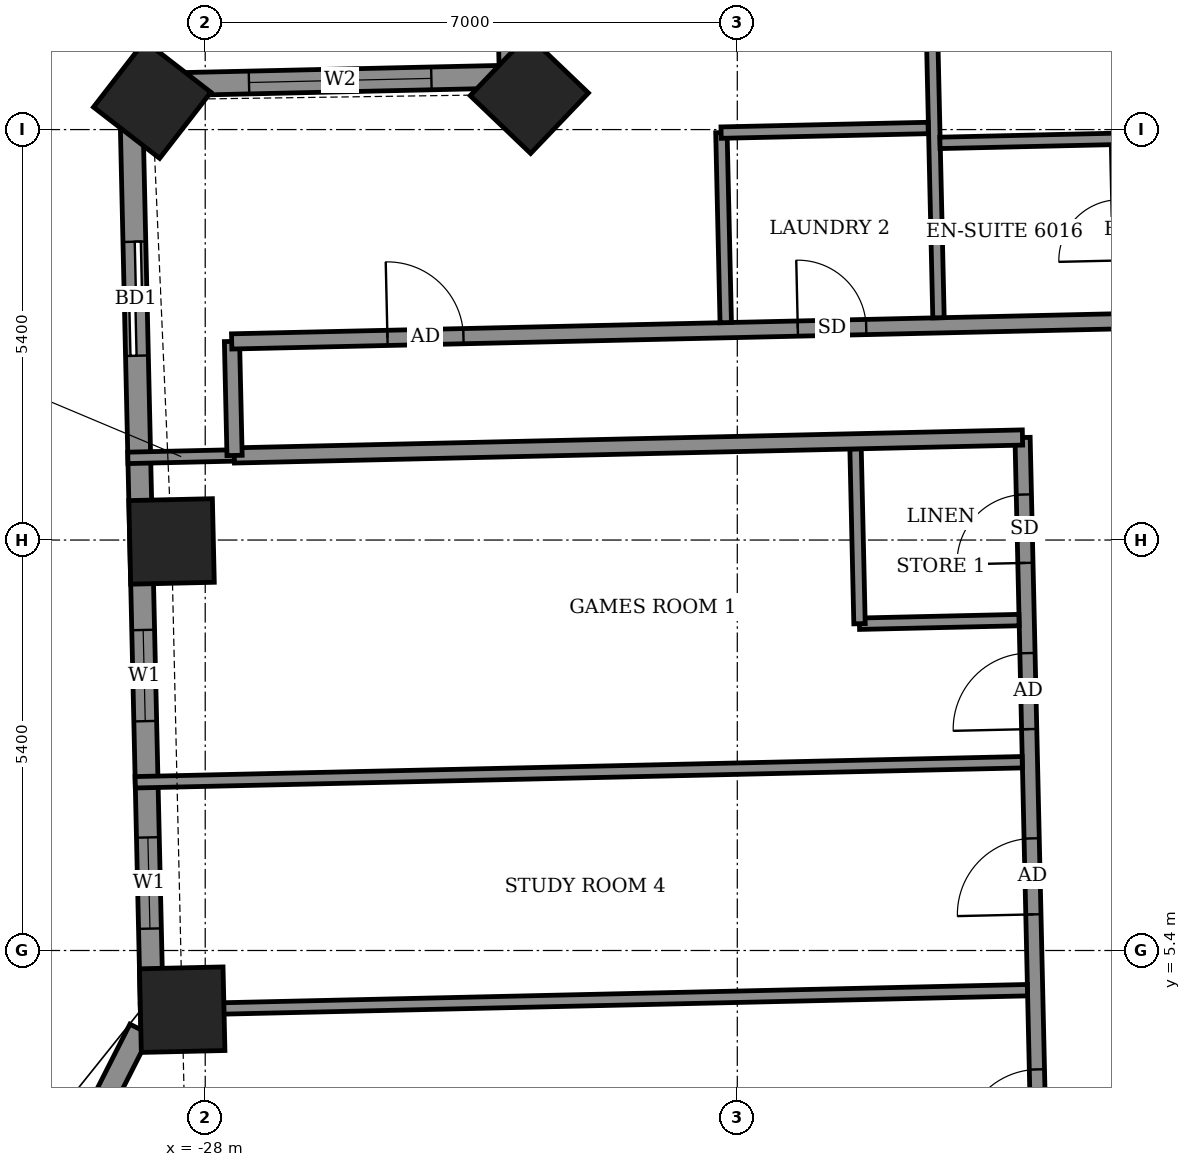
"""IFC4 building model, lengths in metres.
Left out: names, types, materials, properties, quantities, classifications, styles, units other than length and angle.
Written with IfcOpenShell. Run it as: python <this file> out.ifc"""

import sys

from ifc_helpers import new_model, si_unit, direction, frame, frame_2d, origin, origin_2d, place, context, subcontext, project, spatial, rectangle, extrude, element, fill, save


model = new_model("IFC4")
c1 = context("Model", 3, precision=1e-05, world=origin(), true_north=direction((0.0, 1.0)))
c2 = subcontext(c1, "Body", "Model", "MODEL_VIEW")
j1 = project(units=[si_unit("LENGTHUNIT", "METRE"), si_unit("PLANEANGLEUNIT", "RADIAN")], contexts=[c1])
p1 = place(None, origin())
s1 = spatial("IfcSite", under=j1, at=p1, CompositionType="ELEMENT")
p2 = place(p1, origin())
s2 = spatial("IfcBuilding", under=s1, at=p2, CompositionType="ELEMENT")
p3 = place(p2, frame((0.0, 0.0, 238.3)))
s3 = spatial("IfcBuildingStorey", under=s2, at=p3, CompositionType="ELEMENT", Elevation=238.3)
for number, where, z_axis, x_axis in (
    (1, (-23.736, 16.664, -0.55), (0.0, 0.0, 1.0), (-0.691, -0.723, 0.0)),
    (2, (-28.698, 16.593, -0.55), (0.0, 0.0, 1.0), (-0.612, -0.791, 0.0)),
    (3, (-28.443, 10.781, -0.55), (0.0, 0.0, 1.0), (0.023, -1.0, 0.0)),
    (4, (-28.303, 4.622, -0.55), (0.0, 0.0, 1.0), (0.023, -1.0, 0.0)),
):
    element("IfcColumn", number, at=place(p3, frame(where, z_axis=z_axis, x_axis=x_axis)), inside=s3, PredefinedType="COLUMN", context=c2, shape_type="SweptSolid", body=[
        extrude(rectangle(XDim=1.1, YDim=1.1, at=origin_2d()), origin(), (0.0, 0.0, 1.0), 3.6),
    ])
p4 = place(p3, frame((-24.094, 21.896, 0.0), z_axis=(0.0, 0.0, 1.0), x_axis=(0.022606059803, -0.999744450377, 0.0)))
e5 = element("IfcWall", 5, at=p4, inside=s3, PredefinedType="SOLIDWALL", context=c2, shape_type="SweptSolid", body=[
    extrude(rectangle(XDim=5.0, YDim=0.3, at=frame_2d((2.5, 0.0))), origin(), (0.0, 0.0, 1.0), 2.55),
])
p5 = place(p4, frame((1.566, 0.0, 0.9)))
e6 = element("IfcOpeningElement", 6, at=p5, cuts=e5, PredefinedType="OPENING", context=c2, shape_type="SweptSolid", body=[
    extrude(rectangle(XDim=2.4, YDim=1.5, at=frame_2d((1.2, 0.75))), frame((0.0, 0.16, 0.0), z_axis=(0.0, -1.0, 0.0), x_axis=(1.0, 0.0, 0.0)), (0.0, 0.0, 1.0), 0.32),
])
p6 = place(p3, frame((-23.981, 16.897, 0.0), z_axis=(0.0, 0.0, 1.0), x_axis=(-0.999744350543, -0.022610474516, 0.0)))
e7 = element("IfcWall", 7, at=p6, inside=s3, PredefinedType="SOLIDWALL", context=c2, shape_type="SweptSolid", body=[
    extrude(rectangle(XDim=4.999, YDim=0.3, at=frame_2d((2.5, 0.0))), origin(), (0.0, 0.0, 1.0), 2.55),
])
p7 = place(p6, frame((1.044, 0.0, 0.9)))
e8 = element("IfcOpeningElement", 8, at=p7, cuts=e7, PredefinedType="OPENING", context=c2, shape_type="SweptSolid", body=[
    extrude(rectangle(XDim=2.4, YDim=1.5, at=frame_2d((1.2, 0.75))), frame((0.0, 0.16, 0.0), z_axis=(0.0, -1.0, 0.0), x_axis=(1.0, 0.0, 0.0)), (0.0, 0.0, 1.0), 0.32),
])
p8 = place(p3, frame((-28.979, 16.784, 0.0), z_axis=(0.0, 0.0, 1.0), x_axis=(0.022685159264, -0.999742658662, 0.0)))
e9 = element("IfcWall", 9, at=p8, inside=s3, PredefinedType="SOLIDWALL", context=c2, shape_type="SweptSolid", body=[
    extrude(rectangle(XDim=12.699, YDim=0.3, at=frame_2d((6.35, 0.0))), origin(), (0.0, 0.0, 1.0), 2.55),
])
p9 = place(p8, frame((2.06, 0.0, 0.0)))
e10 = element("IfcOpeningElement", 10, at=p9, cuts=e9, PredefinedType="OPENING", context=c2, shape_type="SweptSolid", body=[
    extrude(rectangle(XDim=1.5, YDim=2.4, at=frame_2d((0.75, 1.2))), frame((0.0, 0.16, 0.0), z_axis=(0.0, -1.0, 0.0), x_axis=(1.0, 0.0, 0.0)), (0.0, 0.0, 1.0), 0.32),
])
p10 = place(p8, frame((7.169, 0.0, 0.9)))
e11 = element("IfcOpeningElement", 11, at=p10, cuts=e9, PredefinedType="OPENING", context=c2, shape_type="SweptSolid", body=[
    extrude(rectangle(XDim=1.2, YDim=1.5, at=frame_2d((0.6, 0.75))), frame((0.0, 0.16, 0.0), z_axis=(0.0, -1.0, 0.0), x_axis=(1.0, 0.0, 0.0)), (0.0, 0.0, 1.0), 0.32),
])
p11 = place(p8, frame((9.899, 0.0, 0.9)))
e12 = element("IfcOpeningElement", 12, at=p11, cuts=e9, PredefinedType="OPENING", context=c2, shape_type="SweptSolid", body=[
    extrude(rectangle(XDim=1.2, YDim=1.5, at=frame_2d((0.6, 0.75))), frame((0.0, 0.16, 0.0), z_axis=(0.0, -1.0, 0.0), x_axis=(1.0, 0.0, 0.0)), (0.0, 0.0, 1.0), 0.32),
])
p12 = place(p3, frame((-28.857, 4.363, 0.0), z_axis=(0.0, 0.0, 1.0), x_axis=(-0.45277700056, -0.891623792731, 0.0)))
e13 = element("IfcWall", 13, at=p12, inside=s3, PredefinedType="SOLIDWALL", context=c2, shape_type="SweptSolid", body=[
    extrude(rectangle(XDim=5.398, YDim=0.3, at=frame_2d((2.699, 0.0))), origin(), (0.0, 0.0, 1.0), 3.05),
])
p13 = place(p12, frame((3.881, 0.0, 0.9)))
e14 = element("IfcOpeningElement", 14, at=p13, cuts=e13, PredefinedType="OPENING", context=c2, shape_type="SweptSolid", body=[
    extrude(rectangle(XDim=1.2, YDim=1.5, at=frame_2d((0.6, 0.75))), frame((0.0, 0.16, 0.0), z_axis=(0.0, -1.0, 0.0), x_axis=(1.0, 0.0, 0.0)), (0.0, 0.0, 1.0), 0.32),
])
p14 = place(p3, frame((-16.678, -12.919, 0.0), z_axis=(0.0, 0.0, 1.0), x_axis=(-0.022696191528, 0.999742408268, 0.0)))
e15 = element("IfcWall", 15, at=p14, inside=s3, PredefinedType="PARTITIONING", context=c2, shape_type="SweptSolid", body=[
    extrude(rectangle(XDim=25.074, YDim=0.2, at=frame_2d((12.537, 0.0))), origin(), (0.0, 0.0, 1.0), 3.05),
])
p15 = place(p14, frame((21.237, 0.0, 0.0)))
e16 = element("IfcOpeningElement", 16, at=p15, cuts=e15, PredefinedType="OPENING", context=c2, shape_type="SweptSolid", body=[
    extrude(rectangle(XDim=1.0, YDim=2.1, at=frame_2d((0.5, 1.05))), frame((0.0, 0.11, 0.0), z_axis=(0.0, -1.0, 0.0), x_axis=(1.0, 0.0, 0.0)), (0.0, 0.0, 1.0), 0.22),
])
p16 = place(p14, frame((23.424, 0.0, 0.0)))
e17 = element("IfcOpeningElement", 17, at=p16, cuts=e15, PredefinedType="OPENING", context=c2, shape_type="SweptSolid", body=[
    extrude(rectangle(XDim=0.9, YDim=2.1, at=frame_2d((0.45, 1.05))), frame((0.0, 0.11, 0.0), z_axis=(0.0, -1.0, 0.0), x_axis=(1.0, 0.0, 0.0)), (0.0, 0.0, 1.0), 0.22),
])
p17 = place(p14, frame((18.799, 0.0, 0.0)))
e18 = element("IfcOpeningElement", 18, at=p17, cuts=e15, PredefinedType="OPENING", context=c2, shape_type="SweptSolid", body=[
    extrude(rectangle(XDim=1.0, YDim=2.1, at=frame_2d((0.5, 1.05))), frame((0.0, 0.11, 0.0), z_axis=(0.0, -1.0, 0.0), x_axis=(1.0, 0.0, 0.0)), (0.0, 0.0, 1.0), 0.22),
])
p18 = place(p14, frame((15.759, 0.0, 0.0)))
e19 = element("IfcOpeningElement", 19, at=p18, cuts=e15, PredefinedType="OPENING", context=c2, shape_type="SweptSolid", body=[
    extrude(rectangle(XDim=1.0, YDim=2.1, at=frame_2d((0.5, 1.05))), frame((0.0, 0.11, 0.0), z_axis=(0.0, -1.0, 0.0), x_axis=(1.0, 0.0, 0.0)), (0.0, 0.0, 1.0), 0.22),
])
p19 = place(p14, frame((12.76, 0.0, 0.0)))
e20 = element("IfcOpeningElement", 20, at=p19, cuts=e15, PredefinedType="OPENING", context=c2, shape_type="SweptSolid", body=[
    extrude(rectangle(XDim=1.0, YDim=2.1, at=frame_2d((0.5, 1.05))), frame((0.0, 0.11, 0.0), z_axis=(0.0, -1.0, 0.0), x_axis=(1.0, 0.0, 0.0)), (0.0, 0.0, 1.0), 0.22),
])
p20 = place(p14, frame((9.752, 0.0, 0.0)))
e21 = element("IfcOpeningElement", 21, at=p20, cuts=e15, PredefinedType="OPENING", context=c2, shape_type="SweptSolid", body=[
    extrude(rectangle(XDim=1.0, YDim=2.1, at=frame_2d((0.5, 1.05))), frame((0.0, 0.11, 0.0), z_axis=(0.0, -1.0, 0.0), x_axis=(1.0, 0.0, 0.0)), (0.0, 0.0, 1.0), 0.22),
])
p21 = place(p14, frame((7.199, 0.0, 0.0)))
e22 = element("IfcOpeningElement", 22, at=p21, cuts=e15, PredefinedType="OPENING", context=c2, shape_type="SweptSolid", body=[
    extrude(rectangle(XDim=1.0, YDim=2.1, at=frame_2d((0.5, 1.05))), frame((0.0, 0.11, 0.0), z_axis=(0.0, -1.0, 0.0), x_axis=(1.0, 0.0, 0.0)), (0.0, 0.0, 1.0), 0.22),
])
p22 = place(p14, frame((4.899, 0.0, 0.0)))
e23 = element("IfcOpeningElement", 23, at=p22, cuts=e15, PredefinedType="OPENING", context=c2, shape_type="SweptSolid", body=[
    extrude(rectangle(XDim=0.9, YDim=2.1, at=frame_2d((0.45, 1.05))), frame((0.0, 0.11, 0.0), z_axis=(0.0, -1.0, 0.0), x_axis=(1.0, 0.0, 0.0)), (0.0, 0.0, 1.0), 0.22),
])
p23 = place(p3, frame((-28.853, 4.613, 0.0), z_axis=(0.0, 0.0, 1.0), x_axis=(0.999742483, 0.022692899457, 0.0)))
e24 = element("IfcWall", 24, at=p23, inside=s3, PredefinedType="PARTITIONING", context=c2, shape_type="SweptSolid", body=[
    extrude(rectangle(XDim=11.673, YDim=0.15, at=frame_2d((5.836, 0.0))), origin(), (0.0, 0.0, 1.0), 3.05),
])
p24 = place(p3, frame((-28.921, 7.613, 0.0), z_axis=(0.0, 0.0, 1.0), x_axis=(0.999744377516, 0.022609281843, 0.0)))
e25 = element("IfcWall", 25, at=p24, inside=s3, PredefinedType="PARTITIONING", context=c2, shape_type="SweptSolid", body=[
    extrude(rectangle(XDim=11.673, YDim=0.15, at=frame_2d((5.836, 0.0))), origin(), (0.0, 0.0, 1.0), 2.55),
])
p25 = place(p3, frame((-19.393, 9.699, 0.0), z_axis=(0.0, 0.0, 1.0), x_axis=(0.999737616439, 0.022906293375, 0.0)))
e26 = element("IfcWall", 26, at=p25, inside=s3, PredefinedType="PARTITIONING", context=c2, shape_type="SweptSolid", body=[
    extrude(rectangle(XDim=2.1, YDim=0.15, at=frame_2d((1.05, 0.0))), origin(), (0.0, 0.0, 1.0), 3.05),
])
p26 = place(p3, frame((-19.392, 9.699, 0.0), z_axis=(0.0, 0.0, 1.0), x_axis=(-0.022603288534, 0.999744513037, 0.0)))
e27 = element("IfcWall", 27, at=p26, inside=s3, PredefinedType="PARTITIONING", context=c2, shape_type="SweptSolid", body=[
    extrude(rectangle(XDim=2.301, YDim=0.15, at=frame_2d((1.15, 0.0))), origin(), (0.0, 0.0, 1.0), 3.05),
])
p27 = place(p3, frame((-29.018, 11.881, 0.0), z_axis=(0.0, 0.0, 1.0), x_axis=(0.999740667531, 0.022772739949, 0.0)))
e28 = element("IfcWall", 28, at=p27, inside=s3, PredefinedType="PARTITIONING", context=c2, shape_type="SweptSolid", body=[
    extrude(rectangle(XDim=1.404, YDim=0.15, at=frame_2d((0.702, 0.0))), origin(), (0.0, 0.0, 1.0), 2.55),
])
p28 = place(p3, frame((-27.618, 11.913, 0.0), z_axis=(0.0, 0.0, 1.0), x_axis=(0.999741483035, 0.022736910479, 0.0)))
e29 = element("IfcWall", 29, at=p28, inside=s3, PredefinedType="PARTITIONING", context=c2, shape_type="SweptSolid", body=[
    extrude(rectangle(XDim=10.373, YDim=0.2, at=frame_2d((5.186, 0.0))), origin(), (0.0, 0.0, 1.0), 3.05),
])
p29 = place(p3, frame((-27.614, 11.913, 0.0), z_axis=(0.0, 0.0, 1.0), x_axis=(-0.022617910375, 0.999744182344, 0.0)))
e30 = element("IfcWall", 30, at=p29, inside=s3, PredefinedType="PARTITIONING", context=c2, shape_type="SweptSolid", body=[
    extrude(rectangle(XDim=1.5, YDim=0.2, at=frame_2d((0.75, 0.0))), origin(), (0.0, 0.0, 1.0), 3.05),
])
p30 = place(p3, frame((-27.652, 13.413, 0.0), z_axis=(0.0, 0.0, 1.0), x_axis=(0.999742610679, 0.022687273792, 0.0)))
e31 = element("IfcWall", 31, at=p30, inside=s3, PredefinedType="PARTITIONING", context=c2, shape_type="SweptSolid", body=[
    extrude(rectangle(XDim=50.857, YDim=0.2, at=frame_2d((25.429, 0.0))), origin(), (0.0, 0.0, 1.0), 3.05),
])
p31 = place(p30, frame((49.179, 0.0, 0.0)))
e32 = element("IfcOpeningElement", 32, at=p31, cuts=e31, PredefinedType="OPENING", context=c2, shape_type="SweptSolid", body=[
    extrude(rectangle(XDim=1.0, YDim=2.1, at=frame_2d((0.5, 1.05))), frame((0.0, 0.11, 0.0), z_axis=(0.0, -1.0, 0.0), x_axis=(1.0, 0.0, 0.0)), (0.0, 0.0, 1.0), 0.22),
])
p32 = place(p30, frame((44.9, 0.0, 0.0)))
e33 = element("IfcOpeningElement", 33, at=p32, cuts=e31, PredefinedType="OPENING", context=c2, shape_type="SweptSolid", body=[
    extrude(rectangle(XDim=0.9, YDim=2.1, at=frame_2d((0.45, 1.05))), frame((0.0, 0.11, 0.0), z_axis=(0.0, -1.0, 0.0), x_axis=(1.0, 0.0, 0.0)), (0.0, 0.0, 1.0), 0.22),
])
p33 = place(p30, frame((40.375, 0.0, 0.0)))
e34 = element("IfcOpeningElement", 34, at=p33, cuts=e31, PredefinedType="OPENING", context=c2, shape_type="SweptSolid", body=[
    extrude(rectangle(XDim=0.9, YDim=2.1, at=frame_2d((0.45, 1.05))), frame((0.0, 0.11, 0.0), z_axis=(0.0, -1.0, 0.0), x_axis=(1.0, 0.0, 0.0)), (0.0, 0.0, 1.0), 0.22),
])
p34 = place(p30, frame((38.425, 0.0, 0.0)))
e35 = element("IfcOpeningElement", 35, at=p34, cuts=e31, PredefinedType="OPENING", context=c2, shape_type="SweptSolid", body=[
    extrude(rectangle(XDim=0.9, YDim=2.1, at=frame_2d((0.45, 1.05))), frame((0.0, 0.11, 0.0), z_axis=(0.0, -1.0, 0.0), x_axis=(1.0, 0.0, 0.0)), (0.0, 0.0, 1.0), 0.22),
])
p35 = place(p30, frame((31.625, 0.0, 0.0)))
e36 = element("IfcOpeningElement", 36, at=p35, cuts=e31, PredefinedType="OPENING", context=c2, shape_type="SweptSolid", body=[
    extrude(rectangle(XDim=0.9, YDim=2.1, at=frame_2d((0.45, 1.05))), frame((0.0, 0.11, 0.0), z_axis=(0.0, -1.0, 0.0), x_axis=(1.0, 0.0, 0.0)), (0.0, 0.0, 1.0), 0.22),
])
p36 = place(p30, frame((29.7, 0.0, 0.0)))
e37 = element("IfcOpeningElement", 37, at=p36, cuts=e31, PredefinedType="OPENING", context=c2, shape_type="SweptSolid", body=[
    extrude(rectangle(XDim=0.9, YDim=2.1, at=frame_2d((0.45, 1.05))), frame((0.0, 0.11, 0.0), z_axis=(0.0, -1.0, 0.0), x_axis=(1.0, 0.0, 0.0)), (0.0, 0.0, 1.0), 0.22),
])
p37 = place(p30, frame((22.95, 0.0, 0.0)))
e38 = element("IfcOpeningElement", 38, at=p37, cuts=e31, PredefinedType="OPENING", context=c2, shape_type="SweptSolid", body=[
    extrude(rectangle(XDim=0.9, YDim=2.1, at=frame_2d((0.45, 1.05))), frame((0.0, 0.11, 0.0), z_axis=(0.0, -1.0, 0.0), x_axis=(1.0, 0.0, 0.0)), (0.0, 0.0, 1.0), 0.22),
])
p38 = place(p30, frame((20.95, 0.0, 0.0)))
e39 = element("IfcOpeningElement", 39, at=p38, cuts=e31, PredefinedType="OPENING", context=c2, shape_type="SweptSolid", body=[
    extrude(rectangle(XDim=0.9, YDim=2.1, at=frame_2d((0.45, 1.05))), frame((0.0, 0.11, 0.0), z_axis=(0.0, -1.0, 0.0), x_axis=(1.0, 0.0, 0.0)), (0.0, 0.0, 1.0), 0.22),
])
p39 = place(p30, frame((14.15, 0.0, 0.0)))
e40 = element("IfcOpeningElement", 40, at=p39, cuts=e31, PredefinedType="OPENING", context=c2, shape_type="SweptSolid", body=[
    extrude(rectangle(XDim=0.9, YDim=2.1, at=frame_2d((0.45, 1.05))), frame((0.0, 0.11, 0.0), z_axis=(0.0, -1.0, 0.0), x_axis=(1.0, 0.0, 0.0)), (0.0, 0.0, 1.0), 0.22),
])
p40 = place(p30, frame((12.2, 0.0, 0.0)))
e41 = element("IfcOpeningElement", 41, at=p40, cuts=e31, PredefinedType="OPENING", context=c2, shape_type="SweptSolid", body=[
    extrude(rectangle(XDim=0.9, YDim=2.1, at=frame_2d((0.45, 1.05))), frame((0.0, 0.11, 0.0), z_axis=(0.0, -1.0, 0.0), x_axis=(1.0, 0.0, 0.0)), (0.0, 0.0, 1.0), 0.22),
])
p41 = place(p30, frame((2.05, 0.0, 0.0)))
e42 = element("IfcOpeningElement", 42, at=p41, cuts=e31, PredefinedType="OPENING", context=c2, shape_type="SweptSolid", body=[
    extrude(rectangle(XDim=1.0, YDim=2.1, at=frame_2d((0.5, 1.05))), frame((0.0, 0.11, 0.0), z_axis=(0.0, -1.0, 0.0), x_axis=(1.0, 0.0, 0.0)), (0.0, 0.0, 1.0), 0.22),
])
p42 = place(p30, frame((7.45, 0.0, 0.0)))
e43 = element("IfcOpeningElement", 43, at=p42, cuts=e31, PredefinedType="OPENING", context=c2, shape_type="SweptSolid", body=[
    extrude(rectangle(XDim=0.9, YDim=2.1, at=frame_2d((0.45, 1.05))), frame((0.0, 0.11, 0.0), z_axis=(0.0, -1.0, 0.0), x_axis=(1.0, 0.0, 0.0)), (0.0, 0.0, 1.0), 0.22),
])
p43 = place(p3, frame((-21.152, 13.66, 0.0), z_axis=(0.0, 0.0, 1.0), x_axis=(-0.02274801823, 0.999741230352, 0.0)))
e44 = element("IfcWall", 44, at=p43, inside=s3, PredefinedType="PARTITIONING", context=c2, shape_type="SweptSolid", body=[
    extrude(rectangle(XDim=2.501, YDim=0.15, at=frame_2d((1.25, 0.0))), origin(), (0.0, 0.0, 1.0), 3.05),
])
p44 = place(p3, frame((-18.353, 13.724, 0.0), z_axis=(0.0, 0.0, 1.0), x_axis=(-0.022706435224, 0.999742175663, 0.0)))
e45 = element("IfcWall", 45, at=p44, inside=s3, PredefinedType="PARTITIONING", context=c2, shape_type="SweptSolid", body=[
    extrude(rectangle(XDim=8.15, YDim=0.15, at=frame_2d((4.075, 0.0))), origin(), (0.0, 0.0, 1.0), 2.55),
])
p45 = place(p3, frame((-18.334, 16.025, 0.0), z_axis=(0.0, 0.0, 1.0), x_axis=(0.999740260747, 0.02279059109, 0.0)))
e46 = element("IfcWall", 46, at=p45, inside=s3, PredefinedType="PARTITIONING", context=c2, shape_type="SweptSolid", body=[
    extrude(rectangle(XDim=2.324, YDim=0.15, at=frame_2d((1.162, 0.0))), origin(), (0.0, 0.0, 1.0), 3.05),
])
p46 = place(p3, frame((-21.213, 16.16, 0.0), z_axis=(0.0, 0.0, 1.0), x_axis=(0.999749047428, 0.022401833993, 0.0)))
e47 = element("IfcWall", 47, at=p46, inside=s3, PredefinedType="PARTITIONING", context=c2, shape_type="SweptSolid", body=[
    extrude(rectangle(XDim=2.725, YDim=0.15, at=frame_2d((1.362, 0.0))), origin(), (0.0, 0.0, 1.0), 3.05),
])
p47 = place(p7, origin())
e48 = element("IfcWindow", 48, at=p47, inside=s3, PartitioningType="DOUBLE_PANEL_VERTICAL", PredefinedType="WINDOW", context=c2, shape_type="SweptSolid", body=[
    extrude(rectangle(XDim=2.4, YDim=1.5, at=frame_2d((1.2, 0.75))), frame((0.0, 0.03, 0.0), z_axis=(0.0, -1.0, 0.0), x_axis=(1.0, 0.0, 0.0)), (0.0, 0.0, 1.0), 0.06),
])
fill(e8, e48)
p48 = place(p9, origin())
e49 = element("IfcDoor", 49, at=p48, inside=s3, OperationType="SLIDING_TO_LEFT", PredefinedType="DOOR", context=c2, shape_type="SweptSolid", body=[
    extrude(rectangle(XDim=1.5, YDim=2.4, at=frame_2d((0.75, 1.2))), frame((0.0, 0.025, 0.0), z_axis=(0.0, -1.0, 0.0), x_axis=(1.0, 0.0, 0.0)), (0.0, 0.0, 1.0), 0.05),
])
fill(e10, e49)
p49 = place(p10, origin())
e50 = element("IfcWindow", 50, at=p49, inside=s3, PartitioningType="SINGLE_PANEL", PredefinedType="WINDOW", context=c2, shape_type="SweptSolid", body=[
    extrude(rectangle(XDim=1.2, YDim=1.5, at=frame_2d((0.6, 0.75))), frame((0.0, 0.03, 0.0), z_axis=(0.0, -1.0, 0.0), x_axis=(1.0, 0.0, 0.0)), (0.0, 0.0, 1.0), 0.06),
])
fill(e11, e50)
p50 = place(p11, origin())
e51 = element("IfcWindow", 51, at=p50, inside=s3, PartitioningType="SINGLE_PANEL", PredefinedType="WINDOW", context=c2, shape_type="SweptSolid", body=[
    extrude(rectangle(XDim=1.2, YDim=1.5, at=frame_2d((0.6, 0.75))), frame((0.0, 0.03, 0.0), z_axis=(0.0, -1.0, 0.0), x_axis=(1.0, 0.0, 0.0)), (0.0, 0.0, 1.0), 0.06),
])
fill(e12, e51)
p51 = place(p41, origin())
e52 = element("IfcDoor", 52, at=p51, inside=s3, OperationType="SINGLE_SWING_RIGHT", PredefinedType="DOOR", context=c2, shape_type="SweptSolid", body=[
    extrude(rectangle(XDim=1.0, YDim=2.1, at=frame_2d((0.5, 1.05))), frame((0.0, 0.025, 0.0), z_axis=(0.0, -1.0, 0.0), x_axis=(1.0, 0.0, 0.0)), (0.0, 0.0, 1.0), 0.05),
])
fill(e42, e52)
p52 = place(p42, origin())
e53 = element("IfcDoor", 53, at=p52, inside=s3, OperationType="SINGLE_SWING_LEFT", PredefinedType="DOOR", context=c2, shape_type="SweptSolid", body=[
    extrude(rectangle(XDim=0.9, YDim=2.1, at=frame_2d((0.45, 1.05))), frame((0.0, 0.025, 0.0), z_axis=(0.0, -1.0, 0.0), x_axis=(1.0, 0.0, 0.0)), (0.0, 0.0, 1.0), 0.05),
])
fill(e43, e53)
p53 = place(p15, origin())
e54 = element("IfcDoor", 54, at=p53, inside=s3, OperationType="SINGLE_SWING_LEFT", PredefinedType="DOOR", context=c2, shape_type="SweptSolid", body=[
    extrude(rectangle(XDim=1.0, YDim=2.1, at=frame_2d((0.5, 1.05))), frame((0.0, 0.025, 0.0), z_axis=(0.0, -1.0, 0.0), x_axis=(1.0, 0.0, 0.0)), (0.0, 0.0, 1.0), 0.05),
])
fill(e16, e54)
p54 = place(p16, origin())
e55 = element("IfcDoor", 55, at=p54, inside=s3, OperationType="SINGLE_SWING_RIGHT", PredefinedType="DOOR", context=c2, shape_type="SweptSolid", body=[
    extrude(rectangle(XDim=0.9, YDim=2.1, at=frame_2d((0.45, 1.05))), frame((0.0, 0.025, 0.0), z_axis=(0.0, -1.0, 0.0), x_axis=(1.0, 0.0, 0.0)), (0.0, 0.0, 1.0), 0.05),
])
fill(e17, e55)
p55 = place(p17, origin())
e56 = element("IfcDoor", 56, at=p55, inside=s3, OperationType="SINGLE_SWING_RIGHT", PredefinedType="DOOR", context=c2, shape_type="SweptSolid", body=[
    extrude(rectangle(XDim=1.0, YDim=2.1, at=frame_2d((0.5, 1.05))), frame((0.0, 0.025, 0.0), z_axis=(0.0, -1.0, 0.0), x_axis=(1.0, 0.0, 0.0)), (0.0, 0.0, 1.0), 0.05),
])
fill(e18, e56)
p56 = place(p18, origin())
e57 = element("IfcDoor", 57, at=p56, inside=s3, OperationType="SINGLE_SWING_LEFT", PredefinedType="DOOR", context=c2, shape_type="SweptSolid", body=[
    extrude(rectangle(XDim=1.0, YDim=2.1, at=frame_2d((0.5, 1.05))), frame((0.0, 0.025, 0.0), z_axis=(0.0, -1.0, 0.0), x_axis=(1.0, 0.0, 0.0)), (0.0, 0.0, 1.0), 0.05),
])
fill(e19, e57)
save(model, sys.argv[1])
